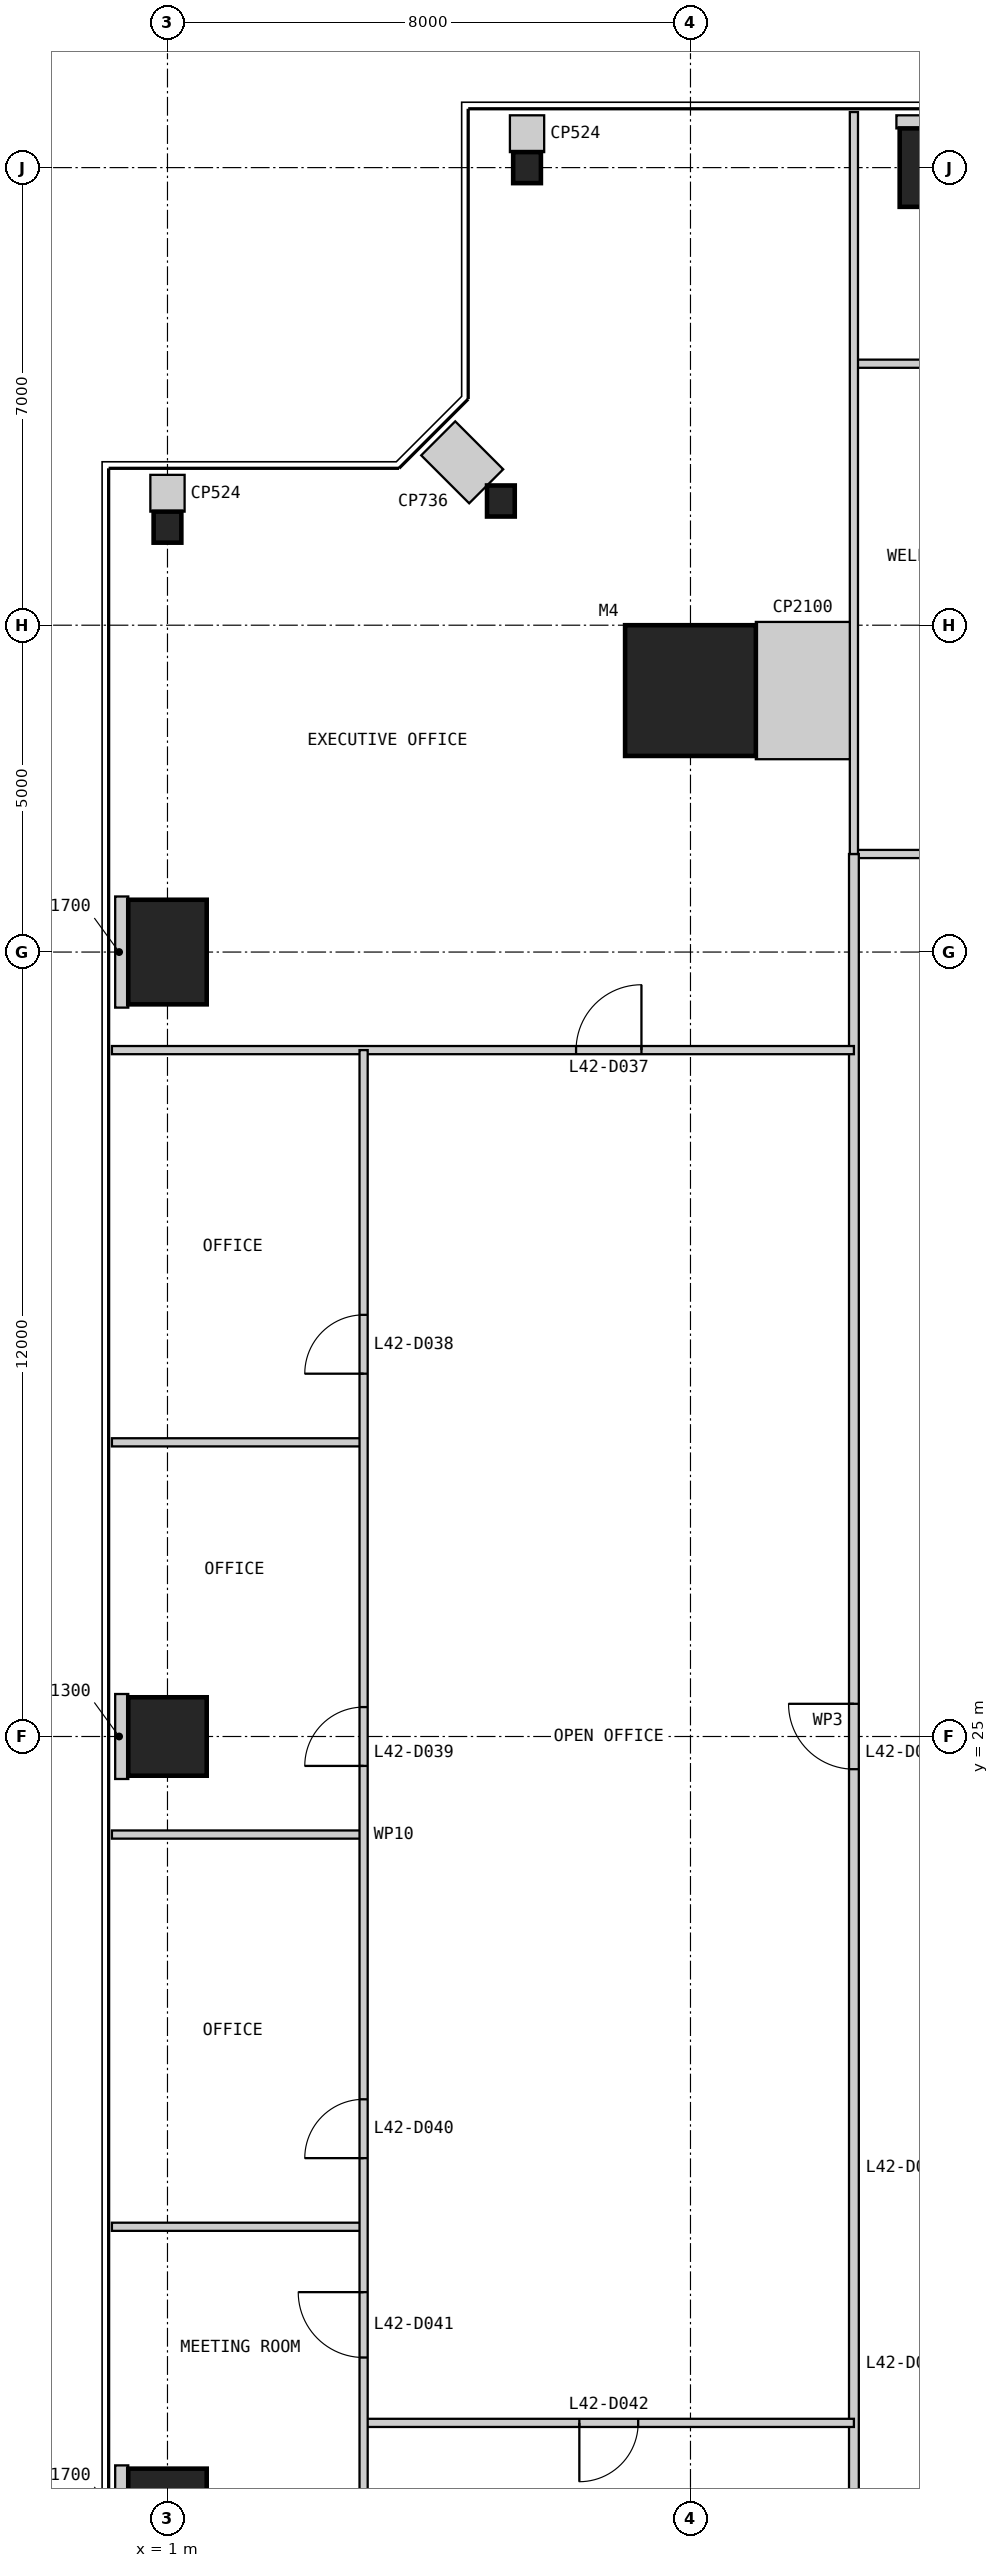
"""IFC4 building model, lengths in metres.
Left out: names, types, materials, properties, quantities, classifications, styles, units other than length and angle.
Written with IfcOpenShell. Run it as: python <this file> out.ifc"""

import sys

from ifc_helpers import new_model, si_unit, direction, frame, frame_2d, origin, origin_2d, place, context, subcontext, project, spatial, rectangle, i_section, extrude, element, fill, save


model = new_model("IFC4")
c1 = context("Model", 3, precision=1e-05, world=origin(), true_north=direction((0.0, 1.0)))
c2 = subcontext(c1, "Body", "Model", "MODEL_VIEW")
j1 = project(units=[si_unit("LENGTHUNIT", "METRE"), si_unit("PLANEANGLEUNIT", "RADIAN")], contexts=[c1])
p1 = place(None, origin())
s1 = spatial("IfcSite", under=j1, at=p1, CompositionType="ELEMENT")
p2 = place(p1, origin())
s2 = spatial("IfcBuilding", under=s1, at=p2, CompositionType="ELEMENT")
p3 = place(p2, frame((0.0, 0.0, 181.8)))
s3 = spatial("IfcBuildingStorey", under=s2, at=p3, CompositionType="ELEMENT", Elevation=181.8)
p4 = place(p3, frame((9.0, 41.0, 0.0), z_axis=(0.0, 0.0, 1.0), x_axis=(1.0, 0.0, 0.0)))
e1 = element("IfcColumn", 1, at=p4, inside=s3, PredefinedType="COLUMN", context=c2, shape_type="SweptSolid", body=[
    extrude(rectangle(XDim=2.0, YDim=2.0, at=origin_2d()), origin(), (0.0, 0.0, 1.0), 4.0),
])
p5 = place(p3, frame((13.0, 49.0, 0.0), z_axis=(0.0, 0.0, 1.0), x_axis=(1.0, 0.0, 0.0)))
e2 = element("IfcColumn", 2, at=p5, inside=s3, PredefinedType="COLUMN", context=c2, shape_type="SweptSolid", body=[
    extrude(rectangle(XDim=1.6, YDim=1.2, at=origin_2d()), origin(), (0.0, 0.0, 1.0), 4.0),
])
for number, where, z_axis, x_axis in (
    (3, (6.5, 49.0, 0.0), (0.0, 0.0, 1.0), (1.0, 0.0, 0.0)),
    (4, (6.1, 43.9, 0.0), (0.0, 0.0, 1.0), (1.0, 0.0, 0.0)),
    (5, (1.0, 43.5, 0.0), (0.0, 0.0, 1.0), (1.0, 0.0, 0.0)),
):
    element("IfcColumn", number, at=place(p3, frame(where, z_axis=z_axis, x_axis=x_axis)), inside=s3, PredefinedType="COLUMN", context=c2, shape_type="SweptSolid", body=[
        extrude(i_section(OverallWidth=0.424, OverallDepth=0.475, WebThickness=0.048, FlangeThickness=0.077, at=origin_2d()), origin(), (0.0, 0.0, 1.0), 4.0),
    ])
p6 = place(p3, frame((1.0, 37.0, 0.0), z_axis=(0.0, 0.0, 1.0), x_axis=(1.0, 0.0, 0.0)))
e6 = element("IfcColumn", 6, at=p6, inside=s3, PredefinedType="COLUMN", context=c2, shape_type="SweptSolid", body=[
    extrude(rectangle(XDim=1.2, YDim=1.6, at=origin_2d()), origin(), (0.0, 0.0, 1.0), 4.0),
])
p7 = place(p3, frame((1.0, 25.0, 0.0), z_axis=(0.0, 0.0, 1.0), x_axis=(1.0, 0.0, 0.0)))
e7 = element("IfcColumn", 7, at=p7, inside=s3, PredefinedType="COLUMN", context=c2, shape_type="SweptSolid", body=[
    extrude(rectangle(XDim=1.2, YDim=1.2, at=origin_2d()), origin(), (0.0, 0.0, 1.0), 4.0),
])
p8 = place(p3, frame((1.0, 13.0, 0.0), z_axis=(0.0, 0.0, 1.0), x_axis=(1.0, 0.0, 0.0)))
e8 = element("IfcColumn", 8, at=p8, inside=s3, PredefinedType="COLUMN", context=c2, shape_type="SweptSolid", body=[
    extrude(rectangle(XDim=1.2, YDim=1.6, at=origin_2d()), origin(), (0.0, 0.0, 1.0), 4.0),
])
p9 = place(p3, frame((35.5, 46.0, 0.0), z_axis=(0.0, 0.0, 1.0), x_axis=(-1.0, 0.0, 0.0)))
e9 = element("IfcWall", 9, at=p9, inside=s3, PredefinedType="PARTITIONING", context=c2, shape_type="SweptSolid", body=[
    extrude(rectangle(XDim=24.0, YDim=0.125, at=frame_2d((12.0, 0.0))), origin(), (0.0, 0.0, 1.0), 3.85),
])
p10 = place(p9, frame((16.05, 0.0, 0.0)))
e10 = element("IfcOpeningElement", 10, at=p10, cuts=e9, PredefinedType="OPENING", context=c2, shape_type="SweptSolid", body=[
    extrude(rectangle(XDim=0.9, YDim=2.2, at=frame_2d((0.45, 1.1))), frame((0.0, 0.073, 0.0), z_axis=(0.0, -1.0, 0.0), x_axis=(1.0, 0.0, 0.0)), (0.0, 0.0, 1.0), 0.145),
])
p11 = place(p9, frame((19.05, 0.0, 0.0)))
e11 = element("IfcOpeningElement", 11, at=p11, cuts=e9, PredefinedType="OPENING", context=c2, shape_type="SweptSolid", body=[
    extrude(rectangle(XDim=0.9, YDim=2.2, at=frame_2d((0.45, 1.1))), frame((0.0, 0.073, 0.0), z_axis=(0.0, -1.0, 0.0), x_axis=(1.0, 0.0, 0.0)), (0.0, 0.0, 1.0), 0.145),
])
p12 = place(p3, frame((14.5, 38.5, 0.0), z_axis=(0.0, 0.0, 1.0), x_axis=(-1.0, 0.0, 0.0)))
e12 = element("IfcWall", 12, at=p12, inside=s3, PredefinedType="PARTITIONING", context=c2, shape_type="SweptSolid", body=[
    extrude(rectangle(XDim=3.0, YDim=0.125, at=frame_2d((1.5, 0.0))), origin(), (0.0, 0.0, 1.0), 3.85),
])
p13 = place(p3, frame((11.5, 38.5, 0.0), z_axis=(0.0, 0.0, 1.0), x_axis=(0.0, -1.0, 0.0)))
e13 = element("IfcWall", 13, at=p13, inside=s3, PredefinedType="PARTITIONING", context=c2, shape_type="SweptSolid", body=[
    extrude(rectangle(XDim=27.0, YDim=0.15, at=frame_2d((13.5, 0.0))), origin(), (0.0, 0.0, 1.0), 3.85),
])
p14 = place(p13, frame((13.0, 0.0, 0.0)))
e14 = element("IfcOpeningElement", 14, at=p14, cuts=e13, PredefinedType="OPENING", context=c2, shape_type="SweptSolid", body=[
    extrude(rectangle(XDim=1.0, YDim=2.2, at=frame_2d((0.5, 1.1))), frame((0.0, 0.085, 0.0), z_axis=(0.0, -1.0, 0.0), x_axis=(1.0, 0.0, 0.0)), (0.0, 0.0, 1.0), 0.17),
])
p15 = place(p3, frame((11.5, 49.85, 0.0), z_axis=(0.0, 0.0, 1.0), x_axis=(0.0, -1.0, 0.0)))
e15 = element("IfcWall", 15, at=p15, inside=s3, PredefinedType="PARTITIONING", context=c2, shape_type="SweptSolid", body=[
    extrude(rectangle(XDim=11.35, YDim=0.125, at=frame_2d((5.675, 0.0))), origin(), (0.0, 0.0, 1.0), 3.85),
])
p16 = place(p3, frame((0.15, 35.5, 0.0), z_axis=(0.0, 0.0, 1.0), x_axis=(1.0, 0.0, 0.0)))
e16 = element("IfcWall", 16, at=p16, inside=s3, PredefinedType="PARTITIONING", context=c2, shape_type="SweptSolid", body=[
    extrude(rectangle(XDim=11.35, YDim=0.125, at=frame_2d((5.675, 0.0))), origin(), (0.0, 0.0, 1.0), 3.85),
])
p17 = place(p16, frame((7.1, 0.0, 0.0)))
e17 = element("IfcOpeningElement", 17, at=p17, cuts=e16, PredefinedType="OPENING", context=c2, shape_type="SweptSolid", body=[
    extrude(rectangle(XDim=1.0, YDim=2.2, at=frame_2d((0.5, 1.1))), frame((0.0, 0.073, 0.0), z_axis=(0.0, -1.0, 0.0), x_axis=(1.0, 0.0, 0.0)), (0.0, 0.0, 1.0), 0.145),
])
for number, where, z_axis, x_axis in (
    (18, (0.15, 29.5, 0.0), (0.0, 0.0, 1.0), (1.0, 0.0, 0.0)),
    (19, (0.15, 23.5, 0.0), (0.0, 0.0, 1.0), (1.0, 0.0, 0.0)),
    (20, (0.15, 17.5, 0.0), (0.0, 0.0, 1.0), (1.0, 0.0, 0.0)),
):
    element("IfcWall", number, at=place(p3, frame(where, z_axis=z_axis, x_axis=x_axis)), inside=s3, PredefinedType="PARTITIONING", context=c2, shape_type="SweptSolid", body=[
        extrude(rectangle(XDim=3.85, YDim=0.125, at=frame_2d((1.925, 0.0))), origin(), (0.0, 0.0, 1.0), 3.85),
    ])
p18 = place(p3, frame((4.0, 14.5, 0.0), z_axis=(0.0, 0.0, 1.0), x_axis=(1.0, 0.0, 0.0)))
e21 = element("IfcWall", 21, at=p18, inside=s3, PredefinedType="PARTITIONING", context=c2, shape_type="SweptSolid", body=[
    extrude(rectangle(XDim=7.5, YDim=0.125, at=frame_2d((3.75, 0.0))), origin(), (0.0, 0.0, 1.0), 3.85),
])
p19 = place(p18, frame((3.3, 0.0, 0.0)))
e22 = element("IfcOpeningElement", 22, at=p19, cuts=e21, PredefinedType="OPENING", context=c2, shape_type="SweptSolid", body=[
    extrude(rectangle(XDim=0.9, YDim=2.2, at=frame_2d((0.45, 1.1))), frame((0.0, 0.073, 0.0), z_axis=(0.0, -1.0, 0.0), x_axis=(1.0, 0.0, 0.0)), (0.0, 0.0, 1.0), 0.145),
])
p20 = place(p3, frame((4.0, 35.5, 0.0), z_axis=(0.0, 0.0, 1.0), x_axis=(0.0, -1.0, 0.0)))
e23 = element("IfcWall", 23, at=p20, inside=s3, PredefinedType="PARTITIONING", context=c2, shape_type="SweptSolid", body=[
    extrude(rectangle(XDim=24.0, YDim=0.125, at=frame_2d((12.0, 0.0))), origin(), (0.0, 0.0, 1.0), 3.238),
])
p21 = place(p20, frame((4.05, 0.0, 0.0)))
e24 = element("IfcOpeningElement", 24, at=p21, cuts=e23, PredefinedType="OPENING", context=c2, shape_type="SweptSolid", body=[
    extrude(rectangle(XDim=0.9, YDim=2.2, at=frame_2d((0.45, 1.1))), frame((0.0, 0.073, 0.0), z_axis=(0.0, -1.0, 0.0), x_axis=(1.0, 0.0, 0.0)), (0.0, 0.0, 1.0), 0.145),
])
p22 = place(p20, frame((10.05, 0.0, 0.0)))
e25 = element("IfcOpeningElement", 25, at=p22, cuts=e23, PredefinedType="OPENING", context=c2, shape_type="SweptSolid", body=[
    extrude(rectangle(XDim=0.9, YDim=2.2, at=frame_2d((0.45, 1.1))), frame((0.0, 0.073, 0.0), z_axis=(0.0, -1.0, 0.0), x_axis=(1.0, 0.0, 0.0)), (0.0, 0.0, 1.0), 0.145),
])
p23 = place(p20, frame((16.05, 0.0, 0.0)))
e26 = element("IfcOpeningElement", 26, at=p23, cuts=e23, PredefinedType="OPENING", context=c2, shape_type="SweptSolid", body=[
    extrude(rectangle(XDim=0.9, YDim=2.2, at=frame_2d((0.45, 1.1))), frame((0.0, 0.073, 0.0), z_axis=(0.0, -1.0, 0.0), x_axis=(1.0, 0.0, 0.0)), (0.0, 0.0, 1.0), 0.145),
])
p24 = place(p20, frame((19.0, 0.0, 0.0)))
e27 = element("IfcOpeningElement", 27, at=p24, cuts=e23, PredefinedType="OPENING", context=c2, shape_type="SweptSolid", body=[
    extrude(rectangle(XDim=1.0, YDim=2.2, at=frame_2d((0.5, 1.1))), frame((0.0, 0.073, 0.0), z_axis=(0.0, -1.0, 0.0), x_axis=(1.0, 0.0, 0.0)), (0.0, 0.0, 1.0), 0.145),
])
p25 = place(p3, frame((13.0, 49.8, 0.0), z_axis=(0.0, 0.0, 1.0), x_axis=(0.0, -1.0, 0.0)))
e28 = element("IfcWall", 28, at=p25, inside=s3, PredefinedType="PARTITIONING", context=c2, shape_type="SweptSolid", body=[
    extrude(rectangle(XDim=0.2, YDim=1.7, at=frame_2d((0.1, 0.0))), origin(), (0.0, 0.0, 1.0), 3.85),
])
p26 = place(p3, frame((11.438, 41.0, 0.0), z_axis=(0.0, 0.0, 1.0), x_axis=(-1.0, 0.0, 0.0)))
e29 = element("IfcWall", 29, at=p26, inside=s3, PredefinedType="PARTITIONING", context=c2, shape_type="SweptSolid", body=[
    extrude(rectangle(XDim=1.438, YDim=2.1, at=frame_2d((0.719, 0.0))), origin(), (0.0, 0.0, 1.0), 3.85),
])
p27 = place(p3, frame((6.5, 49.8, 0.0), z_axis=(0.0, 0.0, 1.0), x_axis=(0.0, -1.0, 0.0)))
e30 = element("IfcWall", 30, at=p27, inside=s3, PredefinedType="PARTITIONING", context=c2, shape_type="SweptSolid", body=[
    extrude(rectangle(XDim=0.562, YDim=0.524, at=frame_2d((0.281, 0.0))), origin(), (0.0, 0.0, 1.0), 3.85),
])
p28 = place(p3, frame((5.141, 44.859, 0.0), z_axis=(0.0, 0.0, 1.0), x_axis=(0.707106781187, -0.707106781187, 0.0)))
e31 = element("IfcWall", 31, at=p28, inside=s3, PredefinedType="PARTITIONING", context=c2, shape_type="SweptSolid", body=[
    extrude(rectangle(XDim=1.038, YDim=0.736, at=frame_2d((0.519, 0.0))), origin(), (0.0, 0.0, 1.0), 3.85),
])
p29 = place(p3, frame((1.0, 44.3, 0.0), z_axis=(0.0, 0.0, 1.0), x_axis=(0.0, -1.0, 0.0)))
e32 = element("IfcWall", 32, at=p29, inside=s3, PredefinedType="PARTITIONING", context=c2, shape_type="SweptSolid", body=[
    extrude(rectangle(XDim=0.562, YDim=0.524, at=frame_2d((0.281, 0.0))), origin(), (0.0, 0.0, 1.0), 3.85),
])
p30 = place(p3, frame((0.2, 37.0, 0.0), z_axis=(0.0, 0.0, 1.0), x_axis=(1.0, 0.0, 0.0)))
e33 = element("IfcWall", 33, at=p30, inside=s3, PredefinedType="PARTITIONING", context=c2, shape_type="SweptSolid", body=[
    extrude(rectangle(XDim=0.2, YDim=1.7, at=frame_2d((0.1, 0.0))), origin(), (0.0, 0.0, 1.0), 3.85),
])
p31 = place(p3, frame((0.2, 25.0, 0.0), z_axis=(0.0, 0.0, 1.0), x_axis=(1.0, 0.0, 0.0)))
e34 = element("IfcWall", 34, at=p31, inside=s3, PredefinedType="PARTITIONING", context=c2, shape_type="SweptSolid", body=[
    extrude(rectangle(XDim=0.2, YDim=1.3, at=frame_2d((0.1, 0.0))), origin(), (0.0, 0.0, 1.0), 3.85),
])
p32 = place(p3, frame((0.2, 13.0, 0.0), z_axis=(0.0, 0.0, 1.0), x_axis=(1.0, 0.0, 0.0)))
e35 = element("IfcWall", 35, at=p32, inside=s3, PredefinedType="PARTITIONING", context=c2, shape_type="SweptSolid", body=[
    extrude(rectangle(XDim=0.2, YDim=1.7, at=frame_2d((0.1, 0.0))), origin(), (0.0, 0.0, 1.0), 3.85),
])
p33 = place(p14, frame((1.0, 0.0, 0.0), z_axis=(0.0, 0.0, 1.0), x_axis=(-1.0, 0.0, 0.0)))
e36 = element("IfcDoor", 36, at=p33, inside=s3, OperationType="SINGLE_SWING_RIGHT", PredefinedType="DOOR", context=c2, shape_type="SweptSolid", body=[
    extrude(rectangle(XDim=1.0, YDim=2.2, at=frame_2d((0.5, 1.1))), frame((0.0, 0.025, 0.0), z_axis=(0.0, -1.0, 0.0), x_axis=(1.0, 0.0, 0.0)), (0.0, 0.0, 1.0), 0.05),
])
fill(e14, e36)
p34 = place(p17, origin())
e37 = element("IfcDoor", 37, at=p34, inside=s3, OperationType="SINGLE_SWING_RIGHT", PredefinedType="DOOR", context=c2, shape_type="SweptSolid", body=[
    extrude(rectangle(XDim=1.0, YDim=2.2, at=frame_2d((0.5, 1.1))), frame((0.0, 0.025, 0.0), z_axis=(0.0, -1.0, 0.0), x_axis=(1.0, 0.0, 0.0)), (0.0, 0.0, 1.0), 0.05),
])
fill(e17, e37)
p35 = place(p21, frame((0.9, 0.0, 0.0), z_axis=(0.0, 0.0, 1.0), x_axis=(-1.0, 0.0, 0.0)))
e38 = element("IfcDoor", 38, at=p35, inside=s3, OperationType="SINGLE_SWING_LEFT", PredefinedType="DOOR", context=c2, shape_type="SweptSolid", body=[
    extrude(rectangle(XDim=0.9, YDim=2.2, at=frame_2d((0.45, 1.1))), frame((0.0, 0.025, 0.0), z_axis=(0.0, -1.0, 0.0), x_axis=(1.0, 0.0, 0.0)), (0.0, 0.0, 1.0), 0.05),
])
fill(e24, e38)
p36 = place(p22, frame((0.9, 0.0, 0.0), z_axis=(0.0, 0.0, 1.0), x_axis=(-1.0, 0.0, 0.0)))
e39 = element("IfcDoor", 39, at=p36, inside=s3, OperationType="SINGLE_SWING_LEFT", PredefinedType="DOOR", context=c2, shape_type="SweptSolid", body=[
    extrude(rectangle(XDim=0.9, YDim=2.2, at=frame_2d((0.45, 1.1))), frame((0.0, 0.025, 0.0), z_axis=(0.0, -1.0, 0.0), x_axis=(1.0, 0.0, 0.0)), (0.0, 0.0, 1.0), 0.05),
])
fill(e25, e39)
p37 = place(p23, frame((0.9, 0.0, 0.0), z_axis=(0.0, 0.0, 1.0), x_axis=(-1.0, 0.0, 0.0)))
e40 = element("IfcDoor", 40, at=p37, inside=s3, OperationType="SINGLE_SWING_LEFT", PredefinedType="DOOR", context=c2, shape_type="SweptSolid", body=[
    extrude(rectangle(XDim=0.9, YDim=2.2, at=frame_2d((0.45, 1.1))), frame((0.0, 0.025, 0.0), z_axis=(0.0, -1.0, 0.0), x_axis=(1.0, 0.0, 0.0)), (0.0, 0.0, 1.0), 0.05),
])
fill(e26, e40)
p38 = place(p24, frame((1.0, 0.0, 0.0), z_axis=(0.0, 0.0, 1.0), x_axis=(-1.0, 0.0, 0.0)))
e41 = element("IfcDoor", 41, at=p38, inside=s3, OperationType="SINGLE_SWING_RIGHT", PredefinedType="DOOR", context=c2, shape_type="SweptSolid", body=[
    extrude(rectangle(XDim=1.0, YDim=2.2, at=frame_2d((0.5, 1.1))), frame((0.0, 0.025, 0.0), z_axis=(0.0, -1.0, 0.0), x_axis=(1.0, 0.0, 0.0)), (0.0, 0.0, 1.0), 0.05),
])
fill(e27, e41)
p39 = place(p19, frame((0.9, 0.0, 0.0), z_axis=(0.0, 0.0, 1.0), x_axis=(-1.0, 0.0, 0.0)))
e42 = element("IfcDoor", 42, at=p39, inside=s3, OperationType="SINGLE_SWING_RIGHT", PredefinedType="DOOR", context=c2, shape_type="SweptSolid", body=[
    extrude(rectangle(XDim=0.9, YDim=2.2, at=frame_2d((0.45, 1.1))), frame((0.0, 0.025, 0.0), z_axis=(0.0, -1.0, 0.0), x_axis=(1.0, 0.0, 0.0)), (0.0, 0.0, 1.0), 0.05),
])
fill(e22, e42)
save(model, sys.argv[1])
